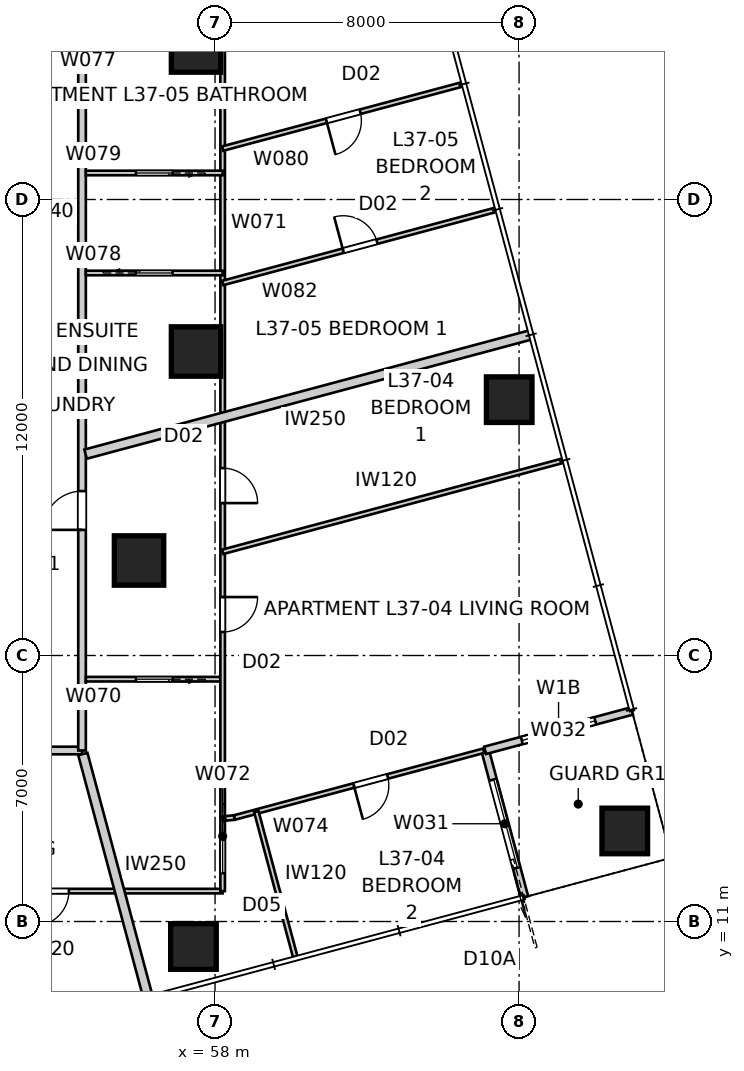
"""IFC4 building model, lengths in metres.
Left out: names, types, materials, properties, quantities, classifications, styles, units other than length and angle.
Written with IfcOpenShell. Run it as: python <this file> out.ifc"""

import sys

from ifc_helpers import new_model, si_unit, direction, frame, frame_2d, origin, origin_2d, place, context, subcontext, project, spatial, rectangle, extrude, element, fill, save


model = new_model("IFC4")
c1 = context("Model", 3, precision=1e-05, world=origin(), true_north=direction((0.0, 1.0)))
c2 = subcontext(c1, "Body", "Model", "MODEL_VIEW")
j1 = project(units=[si_unit("LENGTHUNIT", "METRE"), si_unit("PLANEANGLEUNIT", "RADIAN")], contexts=[c1])
p1 = place(None, origin())
s1 = spatial("IfcSite", under=j1, at=p1, CompositionType="ELEMENT")
p2 = place(p1, origin())
s2 = spatial("IfcBuilding", under=s1, at=p2, CompositionType="ELEMENT")
p3 = place(p2, frame((0.0, 0.0, 135.4)))
s3 = spatial("IfcBuildingStorey", under=s2, at=p3, CompositionType="ELEMENT", Elevation=135.4)
for number, where, z_axis, x_axis in (
    (1, (57.432, 10.342, 0.0), (0.0, 0.0, 1.0), (1.0, 0.0, 0.0)),
    (2, (68.781, 13.383, 0.0), (0.0, 0.0, 1.0), (1.0, 0.0, 0.0)),
    (3, (65.74, 24.733, 0.0), (0.0, 0.0, 1.0), (1.0, 0.0, 0.0)),
):
    element("IfcColumn", number, at=place(p3, frame(where, z_axis=z_axis, x_axis=x_axis)), inside=s3, PredefinedType="COLUMN", context=c2, shape_type="SweptSolid", body=[
        extrude(rectangle(XDim=1.2, YDim=1.2, at=origin_2d()), origin(), (0.0, 0.0, 1.0), 3.2),
    ])
for number, where, z_axis, x_axis in (
    (4, (57.5, 26.0, 0.0), (0.0, 0.0, 1.0), (1.0, 0.0, 0.0)),
    (5, (57.5, 34.0, 0.0), (0.0, 0.0, 1.0), (1.0, 0.0, 0.0)),
    (6, (56.0, 20.5, 0.0), (0.0, 0.0, 1.0), (1.0, 0.0, 0.0)),
):
    element("IfcColumn", number, at=place(p3, frame(where, z_axis=z_axis, x_axis=x_axis)), inside=s3, PredefinedType="COLUMN", context=c2, shape_type="SweptSolid", body=[
        extrude(rectangle(XDim=1.3, YDim=1.3, at=origin_2d()), origin(), (0.0, 0.0, 1.0), 3.4),
    ])
p4 = place(p3, frame((66.143, 11.641, 0.0), z_axis=(0.0, 0.0, 1.0), x_axis=(-0.258843877716, 0.965919172068, 0.0)))
e7 = element("IfcWall", 7, at=p4, inside=s3, PredefinedType="SOLIDWALL", context=c2, shape_type="SweptSolid", body=[
    extrude(rectangle(XDim=4.0, YDim=0.2, at=frame_2d((2.0, 0.0))), origin(), (0.0, 0.0, 1.0), 3.2),
])
p5 = place(p4, frame((0.8, 0.0, 0.0)))
e8 = element("IfcOpeningElement", 8, at=p5, cuts=e7, PredefinedType="OPENING", context=c2, shape_type="SweptSolid", body=[
    extrude(rectangle(XDim=2.4, YDim=2.1, at=frame_2d((1.2, 1.05))), frame((0.0, 0.11, 0.0), z_axis=(0.0, -1.0, 0.0), x_axis=(1.0, 0.0, 0.0)), (0.0, 0.0, 1.0), 0.22),
])
p6 = place(p3, frame((65.107, 15.504, 0.0), z_axis=(0.0, 0.0, 1.0), x_axis=(0.965934430412, 0.258786931944, 0.0)))
e9 = element("IfcWall", 9, at=p6, inside=s3, PredefinedType="SOLIDWALL", context=c2, shape_type="SweptSolid", body=[
    extrude(rectangle(XDim=4.0, YDim=0.2, at=frame_2d((2.0, 0.0))), origin(), (0.0, 0.0, 1.0), 3.2),
])
p7 = place(p6, frame((1.0, 0.0, 0.4)))
e10 = element("IfcOpeningElement", 10, at=p7, cuts=e9, PredefinedType="OPENING", context=c2, shape_type="SweptSolid", body=[
    extrude(rectangle(XDim=2.0, YDim=1.8, at=frame_2d((1.0, 0.9))), frame((0.0, 0.11, 0.0), z_axis=(0.0, -1.0, 0.0), x_axis=(1.0, 0.0, 0.0)), (0.0, 0.0, 1.0), 0.22),
])
p8 = place(p3, frame((25.5, 15.5, 0.0), z_axis=(0.0, 0.0, 1.0), x_axis=(1.0, 0.0, 0.0)))
e11 = element("IfcWall", 11, at=p8, inside=s3, PredefinedType="PARTITIONING", context=c2, shape_type="SweptSolid", body=[
    extrude(rectangle(XDim=29.0, YDim=0.2, at=frame_2d((14.5, 0.0))), origin(), (0.0, 0.0, 1.0), 3.2),
])
p9 = place(p8, frame((25.146, 0.0, 0.0)))
e12 = element("IfcOpeningElement", 12, at=p9, cuts=e11, PredefinedType="OPENING", context=c2, shape_type="SweptSolid", body=[
    extrude(rectangle(XDim=1.02, YDim=2.0, at=frame_2d((0.51, 1.0))), frame((0.0, 0.11, 0.0), z_axis=(0.0, -1.0, 0.0), x_axis=(1.0, 0.0, 0.0)), (0.0, 0.0, 1.0), 0.22),
])
p10 = place(p8, frame((1.761, 0.0, 0.0)))
e13 = element("IfcOpeningElement", 13, at=p10, cuts=e11, PredefinedType="OPENING", context=c2, shape_type="SweptSolid", body=[
    extrude(rectangle(XDim=1.02, YDim=2.34, at=frame_2d((0.51, 1.17))), frame((0.0, 0.11, 0.0), z_axis=(0.0, -1.0, 0.0), x_axis=(1.0, 0.0, 0.0)), (0.0, 0.0, 1.0), 0.22),
])
p11 = place(p3, frame((54.5, 15.5, 0.0), z_axis=(0.0, 0.0, 1.0), x_axis=(0.0, 1.0, 0.0)))
e14 = element("IfcWall", 14, at=p11, inside=s3, PredefinedType="PARTITIONING", context=c2, shape_type="SweptSolid", body=[
    extrude(rectangle(XDim=28.2, YDim=0.2, at=frame_2d((14.1, 0.0))), origin(), (0.0, 0.0, 1.0), 3.2),
])
p12 = place(p11, frame((21.527, 0.0, 0.0)))
e15 = element("IfcOpeningElement", 15, at=p12, cuts=e14, PredefinedType="OPENING", context=c2, shape_type="SweptSolid", body=[
    extrude(rectangle(XDim=1.02, YDim=2.34, at=frame_2d((0.51, 1.17))), frame((0.0, 0.11, 0.0), z_axis=(0.0, -1.0, 0.0), x_axis=(1.0, 0.0, 0.0)), (0.0, 0.0, 1.0), 0.22),
])
p13 = place(p11, frame((5.806, 0.0, 0.0)))
e16 = element("IfcOpeningElement", 16, at=p13, cuts=e14, PredefinedType="OPENING", context=c2, shape_type="SweptSolid", body=[
    extrude(rectangle(XDim=1.02, YDim=2.34, at=frame_2d((0.51, 1.17))), frame((0.0, 0.11, 0.0), z_axis=(0.0, -1.0, 0.0), x_axis=(1.0, 0.0, 0.0)), (0.0, 0.0, 1.0), 0.22),
])
p14 = place(p11, frame((26.127, 0.0, 0.0)))
e17 = element("IfcOpeningElement", 17, at=p14, cuts=e14, PredefinedType="OPENING", context=c2, shape_type="SweptSolid", body=[
    extrude(rectangle(XDim=1.02, YDim=2.34, at=frame_2d((0.51, 1.17))), frame((0.0, 0.11, 0.0), z_axis=(0.0, -1.0, 0.0), x_axis=(1.0, 0.0, 0.0)), (0.0, 0.0, 1.0), 0.22),
])
p15 = place(p3, frame((56.242, 8.988, 0.0), z_axis=(0.0, 0.0, 1.0), x_axis=(-0.25880587229, 0.965929355837, 0.0)))
e18 = element("IfcWall", 18, at=p15, inside=s3, PredefinedType="PARTITIONING", context=c2, shape_type="SweptSolid", body=[
    extrude(rectangle(XDim=6.645, YDim=0.25, at=frame_2d((3.322, 0.0))), origin(), (0.0, 0.0, 1.0), 3.2),
])
p16 = place(p3, frame((66.318, 26.44, 0.0), z_axis=(0.0, 0.0, 1.0), x_axis=(-0.965924438766, -0.258824223352, 0.0)))
e19 = element("IfcWall", 19, at=p16, inside=s3, PredefinedType="PARTITIONING", context=c2, shape_type="SweptSolid", body=[
    extrude(rectangle(XDim=12.138, YDim=0.25, at=frame_2d((6.069, 0.0))), origin(), (0.0, 0.0, 1.0), 3.2),
])
p17 = place(p3, frame((58.2, 11.8, 0.0), z_axis=(0.0, 0.0, 1.0), x_axis=(-1.0, 0.0, 0.0)))
e20 = element("IfcWall", 20, at=p17, inside=s3, PredefinedType="PARTITIONING", context=c2, shape_type="SweptSolid", body=[
    extrude(rectangle(XDim=20.9, YDim=0.12, at=frame_2d((10.45, 0.0))), origin(), (0.0, 0.0, 1.0), 3.2),
])
p18 = place(p17, frame((7.807, 0.0, 0.0)))
e21 = element("IfcOpeningElement", 21, at=p18, cuts=e20, PredefinedType="OPENING", context=c2, shape_type="SweptSolid", body=[
    extrude(rectangle(XDim=0.92, YDim=2.34, at=frame_2d((0.46, 1.17))), frame((0.0, 0.07, 0.0), z_axis=(0.0, -1.0, 0.0), x_axis=(1.0, 0.0, 0.0)), (0.0, 0.0, 1.0), 0.14),
])
p19 = place(p17, frame((4.046, 0.0, 0.0)))
e22 = element("IfcOpeningElement", 22, at=p19, cuts=e20, PredefinedType="OPENING", context=c2, shape_type="SweptSolid", body=[
    extrude(rectangle(XDim=0.92, YDim=2.34, at=frame_2d((0.46, 1.17))), frame((0.0, 0.07, 0.0), z_axis=(0.0, -1.0, 0.0), x_axis=(1.0, 0.0, 0.0)), (0.0, 0.0, 1.0), 0.14),
])
p20 = place(p17, frame((15.602, 0.0, 0.0)))
e23 = element("IfcOpeningElement", 23, at=p20, cuts=e20, PredefinedType="OPENING", context=c2, shape_type="SweptSolid", body=[
    extrude(rectangle(XDim=0.96, YDim=2.1, at=frame_2d((0.48, 1.05))), frame((0.0, 0.07, 0.0), z_axis=(0.0, -1.0, 0.0), x_axis=(1.0, 0.0, 0.0)), (0.0, 0.0, 1.0), 0.14),
])
p21 = place(p3, frame((58.2, 17.377, 0.0), z_axis=(0.0, 0.0, 1.0), x_axis=(-1.0, 0.0, 0.0)))
e24 = element("IfcWall", 24, at=p21, inside=s3, PredefinedType="PARTITIONING", context=c2, shape_type="SweptSolid", body=[
    extrude(rectangle(XDim=3.6, YDim=0.12, at=frame_2d((1.8, 0.0))), origin(), (0.0, 0.0, 1.0), 3.2),
])
p22 = place(p21, frame((1.32, 0.0, 0.0)))
e25 = element("IfcOpeningElement", 25, at=p22, cuts=e24, PredefinedType="OPENING", context=c2, shape_type="SweptSolid", body=[
    extrude(rectangle(XDim=0.96, YDim=2.1, at=frame_2d((0.48, 1.05))), frame((0.0, 0.07, 0.0), z_axis=(0.0, -1.0, 0.0), x_axis=(1.0, 0.0, 0.0)), (0.0, 0.0, 1.0), 0.14),
])
p23 = place(p3, frame((58.2, 48.2, 0.0), z_axis=(0.0, 0.0, 1.0), x_axis=(0.0, -1.0, 0.0)))
e26 = element("IfcWall", 26, at=p23, inside=s3, PredefinedType="PARTITIONING", context=c2, shape_type="SweptSolid", body=[
    extrude(rectangle(XDim=33.512, YDim=0.12, at=frame_2d((16.756, 0.0))), origin(), (0.0, 0.0, 1.0), 2.399),
])
p24 = place(p23, frame((11.441, 0.0, 0.0)))
e27 = element("IfcOpeningElement", 27, at=p24, cuts=e26, PredefinedType="OPENING", context=c2, shape_type="SweptSolid", body=[
    extrude(rectangle(XDim=0.92, YDim=2.34, at=frame_2d((0.46, 1.17))), frame((0.0, 0.07, 0.0), z_axis=(0.0, -1.0, 0.0), x_axis=(1.0, 0.0, 0.0)), (0.0, 0.0, 1.0), 0.14),
])
p25 = place(p23, frame((7.583, 0.0, 0.0)))
e28 = element("IfcOpeningElement", 28, at=p25, cuts=e26, PredefinedType="OPENING", context=c2, shape_type="SweptSolid", body=[
    extrude(rectangle(XDim=0.92, YDim=2.34, at=frame_2d((0.46, 1.17))), frame((0.0, 0.07, 0.0), z_axis=(0.0, -1.0, 0.0), x_axis=(1.0, 0.0, 0.0)), (0.0, 0.0, 1.0), 0.14),
])
p26 = place(p23, frame((25.269, 0.0, 0.0)))
e29 = element("IfcOpeningElement", 29, at=p26, cuts=e26, PredefinedType="OPENING", context=c2, shape_type="SweptSolid", body=[
    extrude(rectangle(XDim=0.92, YDim=2.34, at=frame_2d((0.46, 1.17))), frame((0.0, 0.07, 0.0), z_axis=(0.0, -1.0, 0.0), x_axis=(1.0, 0.0, 0.0)), (0.0, 0.0, 1.0), 0.14),
])
p27 = place(p23, frame((28.662, 0.0, 0.0)))
e30 = element("IfcOpeningElement", 30, at=p27, cuts=e26, PredefinedType="OPENING", context=c2, shape_type="SweptSolid", body=[
    extrude(rectangle(XDim=0.92, YDim=2.34, at=frame_2d((0.46, 1.17))), frame((0.0, 0.07, 0.0), z_axis=(0.0, -1.0, 0.0), x_axis=(1.0, 0.0, 0.0)), (0.0, 0.0, 1.0), 0.14),
])
p28 = place(p23, frame((4.15, 0.0, 0.0)))
e31 = element("IfcOpeningElement", 31, at=p28, cuts=e26, PredefinedType="OPENING", context=c2, shape_type="SweptSolid", body=[
    extrude(rectangle(XDim=0.92, YDim=2.34, at=frame_2d((0.46, 1.17))), frame((0.0, 0.07, 0.0), z_axis=(0.0, -1.0, 0.0), x_axis=(1.0, 0.0, 0.0)), (0.0, 0.0, 1.0), 0.14),
])
p29 = place(p3, frame((58.2, 20.728, 0.0), z_axis=(0.0, 0.0, 1.0), x_axis=(0.965925974596, 0.258818491613, 0.0)))
e32 = element("IfcWall", 32, at=p29, inside=s3, PredefinedType="PARTITIONING", context=c2, shape_type="SweptSolid", body=[
    extrude(rectangle(XDim=9.28, YDim=0.12, at=frame_2d((4.64, 0.0))), origin(), (0.0, 0.0, 1.0), 2.588),
])
p30 = place(p3, frame((65.069, 15.494, 0.0), z_axis=(0.0, 0.0, 1.0), x_axis=(-0.965922865286, -0.258830095464, 0.0)))
e33 = element("IfcWall", 33, at=p30, inside=s3, PredefinedType="PARTITIONING", context=c2, shape_type="SweptSolid", body=[
    extrude(rectangle(XDim=6.793, YDim=0.12, at=frame_2d((3.396, 0.0))), origin(), (0.0, 0.0, 1.0), 3.2),
])
p31 = place(p30, frame((2.617, 0.0, 0.0)))
e34 = element("IfcOpeningElement", 34, at=p31, cuts=e33, PredefinedType="OPENING", context=c2, shape_type="SweptSolid", body=[
    extrude(rectangle(XDim=0.92, YDim=2.34, at=frame_2d((0.46, 1.17))), frame((0.0, 0.07, 0.0), z_axis=(0.0, -1.0, 0.0), x_axis=(1.0, 0.0, 0.0)), (0.0, 0.0, 1.0), 0.14),
])
p32 = place(p3, frame((60.111, 10.066, 0.0), z_axis=(0.0, 0.0, 1.0), x_axis=(-0.258863452657, 0.965913926227, 0.0)))
e35 = element("IfcWall", 35, at=p32, inside=s3, PredefinedType="PARTITIONING", context=c2, shape_type="SweptSolid", body=[
    extrude(rectangle(XDim=3.96, YDim=0.12, at=frame_2d((1.98, 0.0))), origin(), (0.0, 0.0, 1.0), 3.2),
])
p33 = place(p3, frame((54.6, 28.066, 0.0), z_axis=(0.0, 0.0, 1.0), x_axis=(1.0, 0.0, 0.0)))
e36 = element("IfcWall", 36, at=p33, inside=s3, PredefinedType="PARTITIONING", context=c2, shape_type="SweptSolid", body=[
    extrude(rectangle(XDim=3.6, YDim=0.12, at=frame_2d((1.8, 0.0))), origin(), (0.0, 0.0, 1.0), 3.2),
])
p34 = place(p33, frame((1.32, 0.0, 0.0)))
e37 = element("IfcOpeningElement", 37, at=p34, cuts=e36, PredefinedType="OPENING", context=c2, shape_type="SweptSolid", body=[
    extrude(rectangle(XDim=0.96, YDim=2.1, at=frame_2d((0.48, 1.05))), frame((0.0, 0.07, 0.0), z_axis=(0.0, -1.0, 0.0), x_axis=(1.0, 0.0, 0.0)), (0.0, 0.0, 1.0), 0.14),
])
p35 = place(p3, frame((58.2, 30.698, 0.0), z_axis=(0.0, 0.0, 1.0), x_axis=(-1.0, 0.0, 0.0)))
e38 = element("IfcWall", 38, at=p35, inside=s3, PredefinedType="PARTITIONING", context=c2, shape_type="SweptSolid", body=[
    extrude(rectangle(XDim=3.6, YDim=0.12, at=frame_2d((1.8, 0.0))), origin(), (0.0, 0.0, 1.0), 3.2),
])
p36 = place(p35, frame((1.32, 0.0, 0.0)))
e39 = element("IfcOpeningElement", 39, at=p36, cuts=e38, PredefinedType="OPENING", context=c2, shape_type="SweptSolid", body=[
    extrude(rectangle(XDim=0.96, YDim=2.1, at=frame_2d((0.48, 1.05))), frame((0.0, 0.07, 0.0), z_axis=(0.0, -1.0, 0.0), x_axis=(1.0, 0.0, 0.0)), (0.0, 0.0, 1.0), 0.14),
])
p37 = place(p3, frame((64.511, 33.031, 0.0), z_axis=(0.0, 0.0, 1.0), x_axis=(-0.96591852682, -0.258846285554, 0.0)))
e40 = element("IfcWall", 40, at=p37, inside=s3, PredefinedType="PARTITIONING", context=c2, shape_type="SweptSolid", body=[
    extrude(rectangle(XDim=6.533, YDim=0.12, at=frame_2d((3.267, 0.0))), origin(), (0.0, 0.0, 1.0), 3.2),
])
p38 = place(p37, frame((2.787, 0.0, 0.0)))
e41 = element("IfcOpeningElement", 41, at=p38, cuts=e40, PredefinedType="OPENING", context=c2, shape_type="SweptSolid", body=[
    extrude(rectangle(XDim=0.92, YDim=2.34, at=frame_2d((0.46, 1.17))), frame((0.0, 0.07, 0.0), z_axis=(0.0, -1.0, 0.0), x_axis=(1.0, 0.0, 0.0)), (0.0, 0.0, 1.0), 0.14),
])
p39 = place(p3, frame((58.2, 27.802, 0.0), z_axis=(0.0, 0.0, 1.0), x_axis=(0.965925814813, 0.258819087933, 0.0)))
e42 = element("IfcWall", 42, at=p39, inside=s3, PredefinedType="PARTITIONING", context=c2, shape_type="SweptSolid", body=[
    extrude(rectangle(XDim=7.449, YDim=0.12, at=frame_2d((3.725, 0.0))), origin(), (0.0, 0.0, 1.0), 3.2),
])
p40 = place(p39, frame((3.284, 0.0, 0.0)))
e43 = element("IfcOpeningElement", 43, at=p40, cuts=e42, PredefinedType="OPENING", context=c2, shape_type="SweptSolid", body=[
    extrude(rectangle(XDim=0.92, YDim=2.34, at=frame_2d((0.46, 1.17))), frame((0.0, 0.07, 0.0), z_axis=(0.0, -1.0, 0.0), x_axis=(1.0, 0.0, 0.0)), (0.0, 0.0, 1.0), 0.14),
])
p41 = place(p3, frame((58.2, 14.688, 0.0), z_axis=(0.0, 0.0, 1.0), x_axis=(0.0, -1.0, 0.0)))
e44 = element("IfcWall", 44, at=p41, inside=s3, PredefinedType="PARTITIONING", context=c2, shape_type="SweptSolid", body=[
    extrude(rectangle(XDim=2.887, YDim=0.12, at=frame_2d((1.444, 0.0))), origin(), (0.0, 0.0, 1.0), 3.2),
])
p42 = place(p41, frame((1.455, 0.0, 0.0)))
e45 = element("IfcOpeningElement", 45, at=p42, cuts=e44, PredefinedType="OPENING", context=c2, shape_type="SweptSolid", body=[
    extrude(rectangle(XDim=0.96, YDim=2.1, at=frame_2d((0.48, 1.05))), frame((0.0, 0.07, 0.0), z_axis=(0.0, -1.0, 0.0), x_axis=(1.0, 0.0, 0.0)), (0.0, 0.0, 1.0), 0.14),
])
p43 = place(p3, frame((58.507, 13.736, 0.0), z_axis=(0.0, 0.0, 1.0), x_axis=(-0.995169554704, -0.09817106188, 0.0)))
e46 = element("IfcWall", 46, at=p43, inside=s3, PredefinedType="PARTITIONING", context=c2, shape_type="SweptSolid", body=[
    extrude(rectangle(XDim=0.308, YDim=0.12, at=frame_2d((0.154, 0.0))), origin(), (0.0, 0.0, 1.0), 3.2),
])
p44 = place(p5, origin())
e47 = element("IfcDoor", 47, at=p44, inside=s3, OperationType="SLIDING_TO_LEFT", PredefinedType="DOOR", context=c2, shape_type="SweptSolid", body=[
    extrude(rectangle(XDim=2.4, YDim=2.1, at=frame_2d((1.2, 1.05))), frame((0.0, 0.025, 0.0), z_axis=(0.0, -1.0, 0.0), x_axis=(1.0, 0.0, 0.0)), (0.0, 0.0, 1.0), 0.05),
])
fill(e8, e47)
p45 = place(p7, origin())
e48 = element("IfcWindow", 48, at=p45, inside=s3, PartitioningType="SINGLE_PANEL", PredefinedType="WINDOW", context=c2, shape_type="SweptSolid", body=[
    extrude(rectangle(XDim=2.0, YDim=1.8, at=frame_2d((1.0, 0.9))), frame((0.0, 0.03, 0.0), z_axis=(0.0, -1.0, 0.0), x_axis=(1.0, 0.0, 0.0)), (0.0, 0.0, 1.0), 0.06),
])
fill(e10, e48)
p46 = place(p13, origin())
e49 = element("IfcDoor", 49, at=p46, inside=s3, OperationType="SINGLE_SWING_LEFT", PredefinedType="DOOR", context=c2, shape_type="SweptSolid", body=[
    extrude(rectangle(XDim=1.02, YDim=2.34, at=frame_2d((0.51, 1.17))), frame((0.0, 0.025, 0.0), z_axis=(0.0, -1.0, 0.0), x_axis=(1.0, 0.0, 0.0)), (0.0, 0.0, 1.0), 0.05),
])
fill(e16, e49)
p47 = place(p19, origin())
e50 = element("IfcDoor", 50, at=p47, inside=s3, OperationType="SINGLE_SWING_RIGHT", PredefinedType="DOOR", context=c2, shape_type="SweptSolid", body=[
    extrude(rectangle(XDim=0.92, YDim=2.34, at=frame_2d((0.46, 1.17))), frame((0.0, 0.025, 0.0), z_axis=(0.0, -1.0, 0.0), x_axis=(1.0, 0.0, 0.0)), (0.0, 0.0, 1.0), 0.05),
])
fill(e22, e50)
p48 = place(p22, origin())
e51 = element("IfcDoor", 51, at=p48, inside=s3, OperationType="SLIDING_TO_LEFT", PredefinedType="DOOR", context=c2, shape_type="SweptSolid", body=[
    extrude(rectangle(XDim=0.96, YDim=2.1, at=frame_2d((0.48, 1.05))), frame((0.0, 0.025, 0.0), z_axis=(0.0, -1.0, 0.0), x_axis=(1.0, 0.0, 0.0)), (0.0, 0.0, 1.0), 0.05),
])
fill(e25, e51)
p49 = place(p26, origin())
e52 = element("IfcDoor", 52, at=p49, inside=s3, OperationType="SINGLE_SWING_RIGHT", PredefinedType="DOOR", context=c2, shape_type="SweptSolid", body=[
    extrude(rectangle(XDim=0.92, YDim=2.34, at=frame_2d((0.46, 1.17))), frame((0.0, 0.025, 0.0), z_axis=(0.0, -1.0, 0.0), x_axis=(1.0, 0.0, 0.0)), (0.0, 0.0, 1.0), 0.05),
])
fill(e29, e52)
p50 = place(p27, origin())
e53 = element("IfcDoor", 53, at=p50, inside=s3, OperationType="SINGLE_SWING_LEFT", PredefinedType="DOOR", context=c2, shape_type="SweptSolid", body=[
    extrude(rectangle(XDim=0.92, YDim=2.34, at=frame_2d((0.46, 1.17))), frame((0.0, 0.025, 0.0), z_axis=(0.0, -1.0, 0.0), x_axis=(1.0, 0.0, 0.0)), (0.0, 0.0, 1.0), 0.05),
])
fill(e30, e53)
p51 = place(p38, origin())
e54 = element("IfcDoor", 54, at=p51, inside=s3, OperationType="SINGLE_SWING_RIGHT", PredefinedType="DOOR", context=c2, shape_type="SweptSolid", body=[
    extrude(rectangle(XDim=0.92, YDim=2.34, at=frame_2d((0.46, 1.17))), frame((0.0, 0.025, 0.0), z_axis=(0.0, -1.0, 0.0), x_axis=(1.0, 0.0, 0.0)), (0.0, 0.0, 1.0), 0.05),
])
fill(e41, e54)
p52 = place(p36, origin())
e55 = element("IfcDoor", 55, at=p52, inside=s3, OperationType="SLIDING_TO_LEFT", PredefinedType="DOOR", context=c2, shape_type="SweptSolid", body=[
    extrude(rectangle(XDim=0.96, YDim=2.1, at=frame_2d((0.48, 1.05))), frame((0.0, 0.025, 0.0), z_axis=(0.0, -1.0, 0.0), x_axis=(1.0, 0.0, 0.0)), (0.0, 0.0, 1.0), 0.05),
])
fill(e39, e55)
p53 = place(p42, origin())
e56 = element("IfcDoor", 56, at=p53, inside=s3, OperationType="SLIDING_TO_LEFT", PredefinedType="DOOR", context=c2, shape_type="SweptSolid", body=[
    extrude(rectangle(XDim=0.96, YDim=2.1, at=frame_2d((0.48, 1.05))), frame((0.0, 0.025, 0.0), z_axis=(0.0, -1.0, 0.0), x_axis=(1.0, 0.0, 0.0)), (0.0, 0.0, 1.0), 0.05),
])
fill(e45, e56)
p54 = place(p31, origin())
e57 = element("IfcDoor", 57, at=p54, inside=s3, OperationType="SINGLE_SWING_RIGHT", PredefinedType="DOOR", context=c2, shape_type="SweptSolid", body=[
    extrude(rectangle(XDim=0.92, YDim=2.34, at=frame_2d((0.46, 1.17))), frame((0.0, 0.025, 0.0), z_axis=(0.0, -1.0, 0.0), x_axis=(1.0, 0.0, 0.0)), (0.0, 0.0, 1.0), 0.05),
])
fill(e34, e57)
p55 = place(p34, origin())
e58 = element("IfcDoor", 58, at=p55, inside=s3, OperationType="SLIDING_TO_LEFT", PredefinedType="DOOR", context=c2, shape_type="SweptSolid", body=[
    extrude(rectangle(XDim=0.96, YDim=2.1, at=frame_2d((0.48, 1.05))), frame((0.0, 0.025, 0.0), z_axis=(0.0, -1.0, 0.0), x_axis=(1.0, 0.0, 0.0)), (0.0, 0.0, 1.0), 0.05),
])
fill(e37, e58)
p56 = place(p40, origin())
e59 = element("IfcDoor", 59, at=p56, inside=s3, OperationType="SINGLE_SWING_LEFT", PredefinedType="DOOR", context=c2, shape_type="SweptSolid", body=[
    extrude(rectangle(XDim=0.92, YDim=2.34, at=frame_2d((0.46, 1.17))), frame((0.0, 0.025, 0.0), z_axis=(0.0, -1.0, 0.0), x_axis=(1.0, 0.0, 0.0)), (0.0, 0.0, 1.0), 0.05),
])
fill(e43, e59)
save(model, sys.argv[1])
